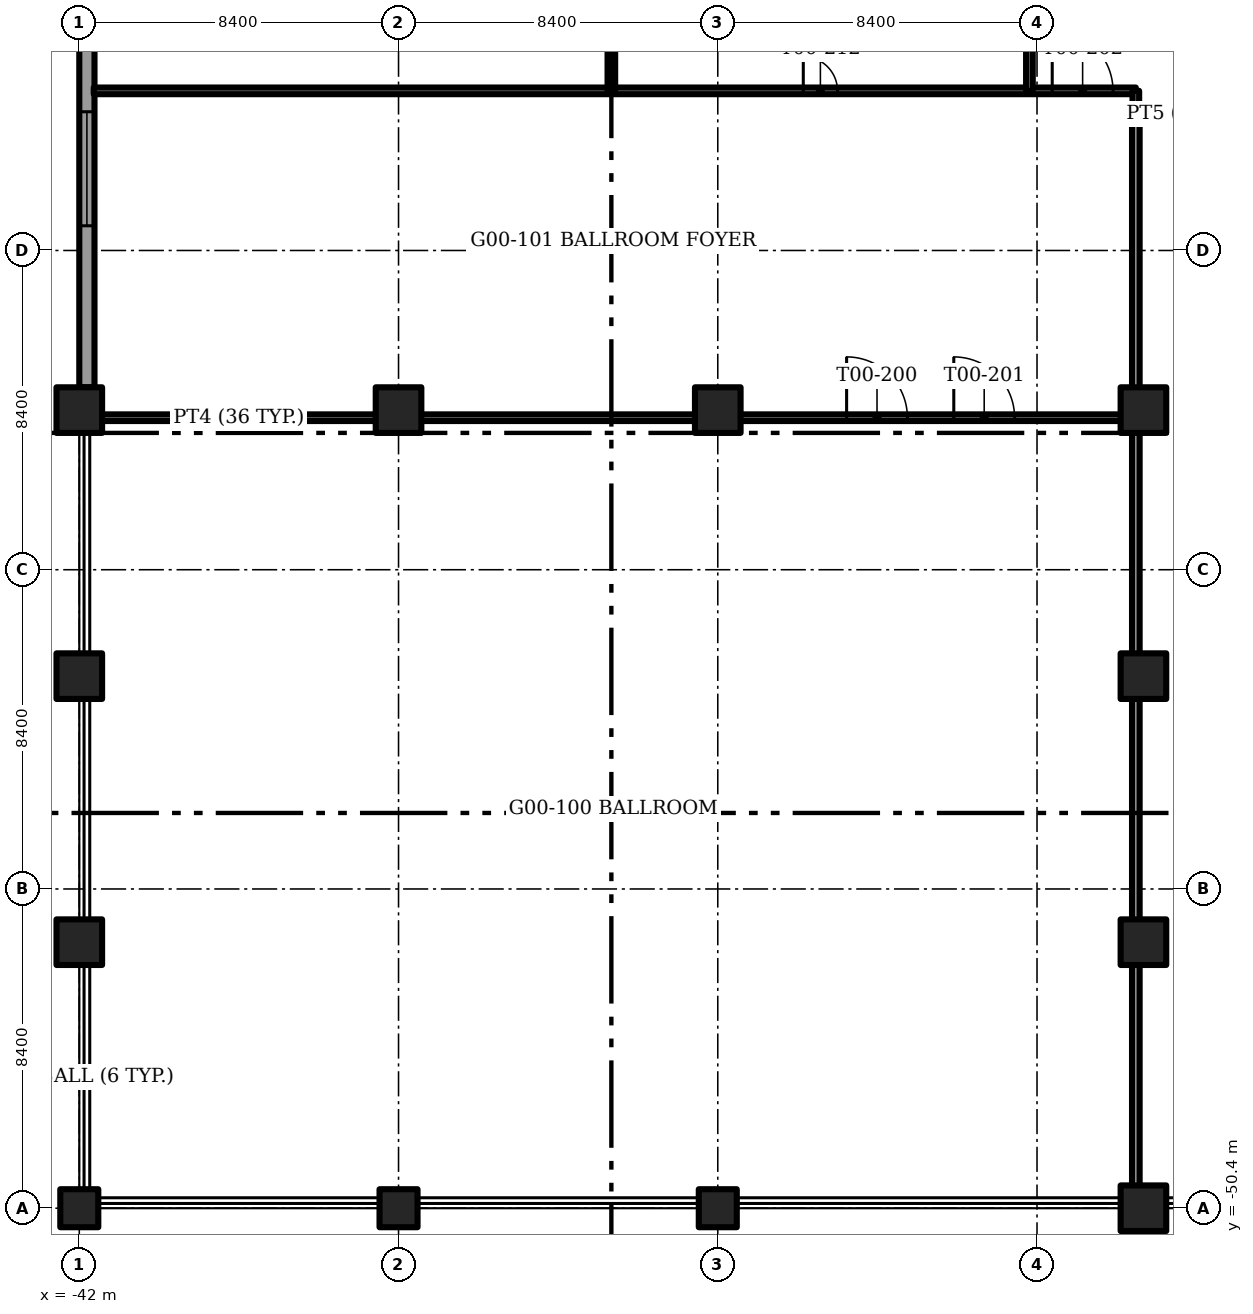
"""IFC4 building model, lengths in metres.
Left out: names, types, materials, properties, quantities, classifications, styles, units other than length and angle.
Written with IfcOpenShell. Run it as: python <this file> out.ifc"""

import sys

from ifc_helpers import new_model, si_unit, direction, frame, frame_2d, origin, origin_2d, place, context, subcontext, project, spatial, rectangle, extrude, element, fill, save


model = new_model("IFC4")
c1 = context("Model", 3, precision=1e-05, world=origin(), true_north=direction((0.0, 1.0)))
c2 = subcontext(c1, "Body", "Model", "MODEL_VIEW")
j1 = project(units=[si_unit("LENGTHUNIT", "METRE"), si_unit("PLANEANGLEUNIT", "RADIAN")], contexts=[c1])
p1 = place(None, origin())
s1 = spatial("IfcSite", under=j1, at=p1, CompositionType="ELEMENT")
p2 = place(p1, origin())
s2 = spatial("IfcBuilding", under=s1, at=p2, CompositionType="ELEMENT")
p3 = place(p2, origin())
s3 = spatial("IfcBuildingStorey", under=s2, at=p3, CompositionType="ELEMENT", Elevation=0.0)
for number, where, z_axis, x_axis in (
    (1, (-42.0, -50.4, -0.35), (0.0, 0.0, 1.0), (1.0, 0.0, 0.0)),
    (2, (-33.6, -50.4, -0.35), (0.0, 0.0, 1.0), (1.0, 0.0, 0.0)),
    (3, (-25.2, -50.4, -0.35), (0.0, 0.0, 1.0), (1.0, 0.0, 0.0)),
):
    element("IfcColumn", number, at=place(p3, frame(where, z_axis=z_axis, x_axis=x_axis)), inside=s3, PredefinedType="COLUMN", context=c2, shape_type="SweptSolid", body=[
        extrude(rectangle(XDim=1.0, YDim=1.0, at=origin_2d()), origin(), (0.0, 0.0, 1.0), 6.0),
    ])
for number, where, z_axis, x_axis in (
    (4, (-14.0, -43.4, -0.35), (0.0, 0.0, 1.0), (1.0, 0.0, 0.0)),
    (5, (-42.0, -43.4, -0.35), (0.0, 0.0, 1.0), (1.0, 0.0, 0.0)),
    (6, (-14.0, -36.4, -0.35), (0.0, 0.0, 1.0), (1.0, 0.0, 0.0)),
    (7, (-42.0, -36.4, -0.35), (0.0, 0.0, 1.0), (1.0, 0.0, 0.0)),
    (8, (-14.0, -50.4, -0.35), (0.0, 0.0, 1.0), (1.0, 0.0, 0.0)),
    (9, (-14.0, -29.4, -0.35), (0.0, 0.0, 1.0), (1.0, 0.0, 0.0)),
    (10, (-42.0, -29.4, -0.35), (0.0, 0.0, 1.0), (1.0, 0.0, 0.0)),
    (11, (-33.6, -29.4, -0.35), (0.0, 0.0, 1.0), (1.0, 0.0, 0.0)),
    (12, (-25.2, -29.4, -0.35), (0.0, 0.0, 1.0), (1.0, 0.0, 0.0)),
):
    element("IfcColumn", number, at=place(p3, frame(where, z_axis=z_axis, x_axis=x_axis)), inside=s3, PredefinedType="COLUMN", context=c2, shape_type="SweptSolid", body=[
        extrude(rectangle(XDim=1.2, YDim=1.2, at=origin_2d()), origin(), (0.0, 0.0, 1.0), 6.0),
    ])
p4 = place(p3, frame((-41.8, -28.8, 0.0), z_axis=(0.0, 0.0, 1.0), x_axis=(0.0, 1.0, 0.0)))
e13 = element("IfcWall", 13, at=p4, inside=s3, PredefinedType="SOLIDWALL", context=c2, shape_type="SweptSolid", body=[
    extrude(rectangle(XDim=11.5, YDim=0.4, at=frame_2d((5.75, 0.0))), origin(), (0.0, 0.0, 1.0), 5.65),
])
p5 = place(p4, frame((4.25, 0.0, 1.0)))
e14 = element("IfcOpeningElement", 14, at=p5, cuts=e13, PredefinedType="OPENING", context=c2, shape_type="SweptSolid", body=[
    extrude(rectangle(XDim=3.0, YDim=2.2, at=frame_2d((1.5, 1.1))), frame((0.0, 0.2, 0.0), z_axis=(0.0, -1.0, 0.0), x_axis=(1.0, 0.0, 0.0)), (0.0, 0.0, 1.0), 0.4),
])
p6 = place(p3, frame((-41.5, -29.6, 0.0), z_axis=(0.0, 0.0, 1.0), x_axis=(1.0, 0.0, 0.0)))
e15 = element("IfcWall", 15, at=p6, inside=s3, PredefinedType="PARTITIONING", context=c2, shape_type="SweptSolid", body=[
    extrude(rectangle(XDim=7.4, YDim=0.175, at=frame_2d((3.7, 0.0))), origin(), (0.0, 0.0, 1.0), 5.65),
])
p7 = place(p3, frame((-33.1, -29.6, 0.0), z_axis=(0.0, 0.0, 1.0), x_axis=(1.0, 0.0, 0.0)))
e16 = element("IfcWall", 16, at=p7, inside=s3, PredefinedType="PARTITIONING", context=c2, shape_type="SweptSolid", body=[
    extrude(rectangle(XDim=7.4, YDim=0.175, at=frame_2d((3.7, 0.0))), origin(), (0.0, 0.0, 1.0), 5.65),
])
p8 = place(p3, frame((-24.7, -29.6, 0.0), z_axis=(0.0, 0.0, 1.0), x_axis=(1.0, 0.0, 0.0)))
e17 = element("IfcWall", 17, at=p8, inside=s3, PredefinedType="PARTITIONING", context=c2, shape_type="SweptSolid", body=[
    extrude(rectangle(XDim=10.2, YDim=0.175, at=frame_2d((5.1, 0.0))), origin(), (0.0, 0.0, 1.0), 5.65),
])
p9 = place(p8, frame((2.89, 0.0, 0.0)))
e18 = element("IfcOpeningElement", 18, at=p9, cuts=e17, PredefinedType="OPENING", context=c2, shape_type="SweptSolid", body=[
    extrude(rectangle(XDim=1.6, YDim=2.1, at=frame_2d((0.8, 1.05))), frame((0.0, 0.087, 0.0), z_axis=(0.0, -1.0, 0.0), x_axis=(1.0, 0.0, 0.0)), (0.0, 0.0, 1.0), 0.175),
])
p10 = place(p8, frame((5.71, 0.0, 0.0)))
e19 = element("IfcOpeningElement", 19, at=p10, cuts=e17, PredefinedType="OPENING", context=c2, shape_type="SweptSolid", body=[
    extrude(rectangle(XDim=1.6, YDim=2.1, at=frame_2d((0.8, 1.05))), frame((0.0, 0.087, 0.0), z_axis=(0.0, -1.0, 0.0), x_axis=(1.0, 0.0, 0.0)), (0.0, 0.0, 1.0), 0.175),
])
p11 = place(p3, frame((-41.62, -21.0, 0.0), z_axis=(0.0, 0.0, 1.0), x_axis=(1.0, 0.0, 0.0)))
e20 = element("IfcWall", 20, at=p11, inside=s3, PredefinedType="PARTITIONING", context=c2, shape_type="SweptSolid", body=[
    extrude(rectangle(XDim=27.42, YDim=0.175, at=frame_2d((13.71, 0.0))), origin(), (0.0, 0.0, 1.0), 5.65),
])
p12 = place(p11, frame((25.22, 0.0, 0.0)))
e21 = element("IfcOpeningElement", 21, at=p12, cuts=e20, PredefinedType="OPENING", context=c2, shape_type="SweptSolid", body=[
    extrude(rectangle(XDim=1.6, YDim=2.1, at=frame_2d((0.8, 1.05))), frame((0.0, 0.087, 0.0), z_axis=(0.0, -1.0, 0.0), x_axis=(1.0, 0.0, 0.0)), (0.0, 0.0, 1.0), 0.175),
])
p13 = place(p11, frame((18.67, 0.0, 0.0)))
e22 = element("IfcOpeningElement", 22, at=p13, cuts=e20, PredefinedType="OPENING", context=c2, shape_type="SweptSolid", body=[
    extrude(rectangle(XDim=0.9, YDim=2.1, at=frame_2d((0.45, 1.05))), frame((0.0, 0.087, 0.0), z_axis=(0.0, -1.0, 0.0), x_axis=(1.0, 0.0, 0.0)), (0.0, 0.0, 1.0), 0.175),
])
p14 = place(p3, frame((-17.0, -21.0, 0.0), z_axis=(0.0, 0.0, 1.0), x_axis=(0.0, 1.0, 0.0)))
e23 = element("IfcWall", 23, at=p14, inside=s3, PredefinedType="PARTITIONING", context=c2, shape_type="SweptSolid", body=[
    extrude(rectangle(XDim=46.2, YDim=0.175, at=frame_2d((23.1, 0.0))), origin(), (0.0, 0.0, 1.0), 4.8),
])
p15 = place(p14, frame((15.996, 0.0, 0.0)))
e24 = element("IfcOpeningElement", 24, at=p15, cuts=e23, PredefinedType="OPENING", context=c2, shape_type="SweptSolid", body=[
    extrude(rectangle(XDim=1.6, YDim=2.1, at=frame_2d((0.8, 1.05))), frame((0.0, 0.087, 0.0), z_axis=(0.0, -1.0, 0.0), x_axis=(1.0, 0.0, 0.0)), (0.0, 0.0, 1.0), 0.175),
])
p16 = place(p14, frame((28.404, 0.0, 0.0)))
e25 = element("IfcOpeningElement", 25, at=p16, cuts=e23, PredefinedType="OPENING", context=c2, shape_type="SweptSolid", body=[
    extrude(rectangle(XDim=1.6, YDim=2.1, at=frame_2d((0.8, 1.05))), frame((0.0, 0.087, 0.0), z_axis=(0.0, -1.0, 0.0), x_axis=(1.0, 0.0, 0.0)), (0.0, 0.0, 1.0), 0.175),
])
p17 = place(p14, frame((41.2, 0.0, 0.0)))
e26 = element("IfcOpeningElement", 26, at=p17, cuts=e23, PredefinedType="OPENING", context=c2, shape_type="SweptSolid", body=[
    extrude(rectangle(XDim=1.6, YDim=2.1, at=frame_2d((0.8, 1.05))), frame((0.0, 0.087, 0.0), z_axis=(0.0, -1.0, 0.0), x_axis=(1.0, 0.0, 0.0)), (0.0, 0.0, 1.0), 0.175),
])
p18 = place(p3, frame((-14.2, -21.6, 0.0), z_axis=(0.0, 0.0, 1.0), x_axis=(0.0, 1.0, 0.0)))
e27 = element("IfcWall", 27, at=p18, inside=s3, PredefinedType="PARTITIONING", context=c2, shape_type="SweptSolid", body=[
    extrude(rectangle(XDim=0.6, YDim=0.175, at=frame_2d((0.3, 0.0))), origin(), (0.0, 0.0, 1.0), 5.65),
])
p19 = place(p3, frame((-28.0, -21.0, 0.0), z_axis=(0.0, 0.0, 1.0), x_axis=(0.0, 1.0, 0.0)))
e28 = element("IfcWall", 28, at=p19, inside=s3, PredefinedType="PARTITIONING", context=c2, shape_type="SweptSolid", body=[
    extrude(rectangle(XDim=7.0, YDim=0.2, at=frame_2d((3.5, 0.0))), origin(), (0.0, 0.0, 1.0), 5.65),
])
p20 = place(p3, frame((-14.2, -21.6, 0.0), z_axis=(0.0, 0.0, 1.0), x_axis=(1.0, 0.0, 0.0)))
e29 = element("IfcWall", 29, at=p20, inside=s3, PredefinedType="PARTITIONING", context=c2, shape_type="SweptSolid", body=[
    extrude(rectangle(XDim=2.95, YDim=0.2, at=frame_2d((1.475, 0.0))), origin(), (0.0, 0.0, 1.0), 5.65),
])
for number, where, z_axis, x_axis in (
    (30, (-14.2, -49.9, 0.0), (0.0, 0.0, 1.0), (0.0, 1.0, 0.0)),
    (31, (-14.2, -42.9, 0.0), (0.0, 0.0, 1.0), (0.0, 1.0, 0.0)),
    (32, (-14.2, -35.9, 0.0), (0.0, 0.0, 1.0), (0.0, 1.0, 0.0)),
):
    element("IfcWall", number, at=place(p3, frame(where, z_axis=z_axis, x_axis=x_axis)), inside=s3, PredefinedType="PARTITIONING", context=c2, shape_type="SweptSolid", body=[
        extrude(rectangle(XDim=6.0, YDim=0.2, at=frame_2d((3.0, 0.0))), origin(), (0.0, 0.0, 1.0), 5.65),
    ])
p21 = place(p3, frame((-14.2, -28.9, 0.0), z_axis=(0.0, 0.0, 1.0), x_axis=(0.0, 1.0, 0.0)))
e33 = element("IfcWall", 33, at=p21, inside=s3, PredefinedType="PARTITIONING", context=c2, shape_type="SweptSolid", body=[
    extrude(rectangle(XDim=7.3, YDim=0.2, at=frame_2d((3.65, 0.0))), origin(), (0.0, 0.0, 1.0), 5.65),
])
p22 = place(p5, origin())
e34 = element("IfcWindow", 34, at=p22, inside=s3, PartitioningType="SINGLE_PANEL", PredefinedType="WINDOW", context=c2, shape_type="SweptSolid", body=[
    extrude(rectangle(XDim=3.0, YDim=2.2, at=frame_2d((1.5, 1.1))), frame((0.0, 0.03, 0.0), z_axis=(0.0, -1.0, 0.0), x_axis=(1.0, 0.0, 0.0)), (0.0, 0.0, 1.0), 0.06),
])
fill(e14, e34)
p23 = place(p9, origin())
e35 = element("IfcDoor", 35, at=p23, inside=s3, OperationType="DOUBLE_DOOR_SINGLE_SWING", PredefinedType="DOOR", context=c2, shape_type="SweptSolid", body=[
    extrude(rectangle(XDim=1.6, YDim=2.1, at=frame_2d((0.8, 1.05))), frame((0.0, 0.025, 0.0), z_axis=(0.0, -1.0, 0.0), x_axis=(1.0, 0.0, 0.0)), (0.0, 0.0, 1.0), 0.05),
])
fill(e18, e35)
p24 = place(p10, origin())
e36 = element("IfcDoor", 36, at=p24, inside=s3, OperationType="DOUBLE_DOOR_SINGLE_SWING", PredefinedType="DOOR", context=c2, shape_type="SweptSolid", body=[
    extrude(rectangle(XDim=1.6, YDim=2.1, at=frame_2d((0.8, 1.05))), frame((0.0, 0.025, 0.0), z_axis=(0.0, -1.0, 0.0), x_axis=(1.0, 0.0, 0.0)), (0.0, 0.0, 1.0), 0.05),
])
fill(e19, e36)
p25 = place(p12, origin())
e37 = element("IfcDoor", 37, at=p25, inside=s3, OperationType="DOUBLE_DOOR_SINGLE_SWING", PredefinedType="DOOR", context=c2, shape_type="SweptSolid", body=[
    extrude(rectangle(XDim=1.6, YDim=2.1, at=frame_2d((0.8, 1.05))), frame((0.0, 0.025, 0.0), z_axis=(0.0, -1.0, 0.0), x_axis=(1.0, 0.0, 0.0)), (0.0, 0.0, 1.0), 0.05),
])
fill(e21, e37)
p26 = place(p13, origin())
e38 = element("IfcDoor", 38, at=p26, inside=s3, OperationType="SINGLE_SWING_RIGHT", PredefinedType="DOOR", context=c2, shape_type="SweptSolid", body=[
    extrude(rectangle(XDim=0.9, YDim=2.1, at=frame_2d((0.45, 1.05))), frame((0.0, 0.025, 0.0), z_axis=(0.0, -1.0, 0.0), x_axis=(1.0, 0.0, 0.0)), (0.0, 0.0, 1.0), 0.05),
])
fill(e22, e38)
save(model, sys.argv[1])
